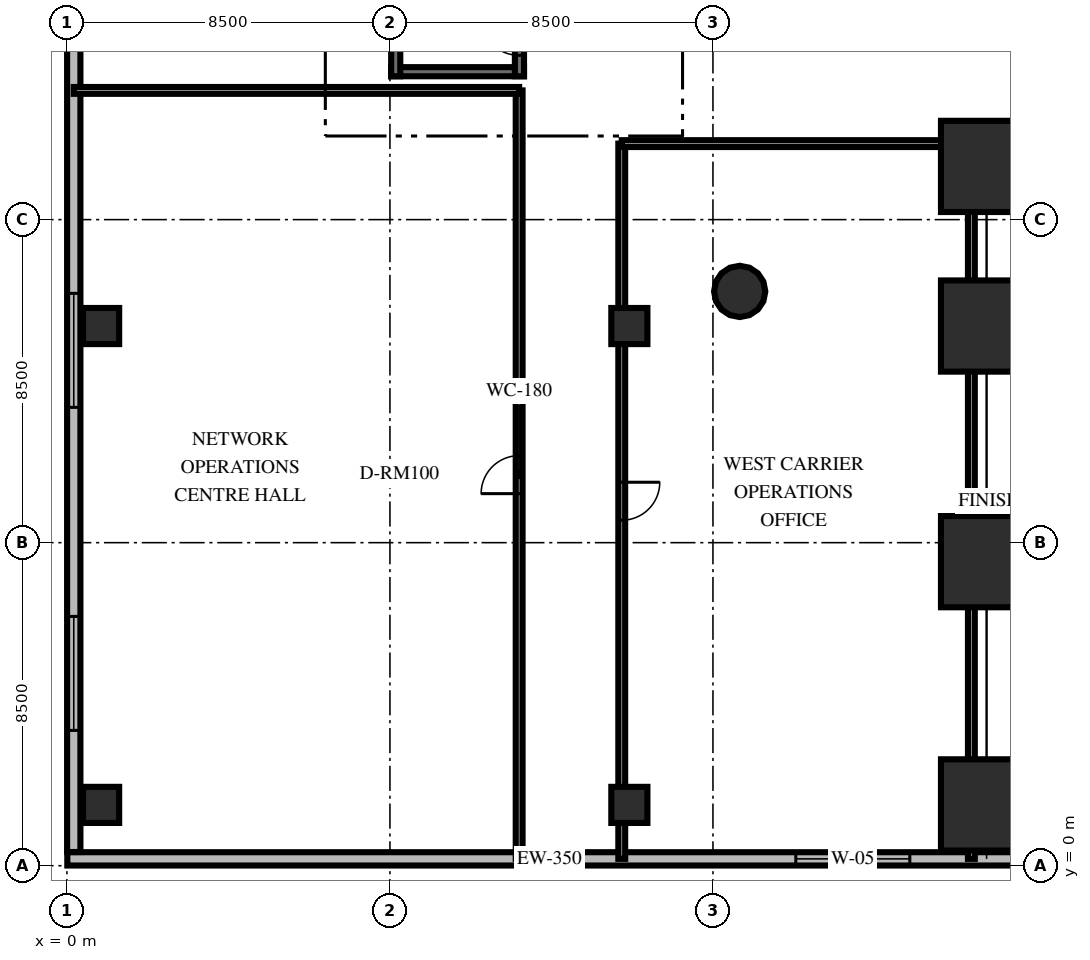
"""IFC4 building model, lengths in metres.
Left out: names, types, materials, properties, quantities, classifications, styles, units other than length and angle.
Written with IfcOpenShell. Run it as: python <this file> out.ifc"""

import sys

from ifc_helpers import new_model, si_unit, direction, frame, frame_2d, origin, origin_2d, place, context, subcontext, project, spatial, rectangle, circle, extrude, element, fill, save


model = new_model("IFC4")
c1 = context("Model", 3, precision=1e-05, world=origin(), true_north=direction((0.0, 1.0)))
c2 = subcontext(c1, "Body", "Model", "MODEL_VIEW")
j1 = project(units=[si_unit("LENGTHUNIT", "METRE"), si_unit("PLANEANGLEUNIT", "RADIAN")], contexts=[c1])
p1 = place(None, origin())
s1 = spatial("IfcSite", under=j1, at=p1, CompositionType="ELEMENT")
p2 = place(p1, origin())
s2 = spatial("IfcBuilding", under=s1, at=p2, CompositionType="ELEMENT")
p3 = place(p2, frame((0.0, 0.0, 10.2)))
s3 = spatial("IfcBuildingStorey", under=s2, at=p3, CompositionType="ELEMENT", Elevation=10.2)
p4 = place(p3, frame((8.532, 20.892, 0.0), z_axis=(0.0, 0.0, 1.0), x_axis=(1.0, 0.0, 0.0)))
e1 = element("IfcWall", 1, at=p4, inside=s3, PredefinedType="SHEAR", context=c2, shape_type="SweptSolid", body=[
    extrude(rectangle(XDim=3.496, YDim=0.24, at=frame_2d((1.748, 0.0))), origin(), (0.0, 0.0, 1.0), 5.4),
])
p5 = place(p3, frame((8.652, 20.772, 0.0), z_axis=(0.0, 0.0, 1.0), x_axis=(0.0, 1.0, 0.0)))
e2 = element("IfcWall", 2, at=p5, inside=s3, PredefinedType="SHEAR", context=c2, shape_type="SweptSolid", body=[
    extrude(rectangle(XDim=9.556, YDim=0.24, at=frame_2d((4.778, 0.0))), origin(), (0.0, 0.0, 1.0), 5.4),
])
p6 = place(p3, frame((11.908, 20.772, 0.0), z_axis=(0.0, 0.0, 1.0), x_axis=(0.0, 1.0, 0.0)))
e3 = element("IfcWall", 3, at=p6, inside=s3, PredefinedType="SHEAR", context=c2, shape_type="SweptSolid", body=[
    extrude(rectangle(XDim=9.556, YDim=0.24, at=frame_2d((4.778, 0.0))), origin(), (0.0, 0.0, 1.0), 5.4),
])
p7 = place(p6, frame((0.55, 0.0, 0.0)))
e4 = element("IfcOpeningElement", 4, at=p7, cuts=e3, PredefinedType="OPENING", context=c2, shape_type="SweptSolid", body=[
    extrude(rectangle(XDim=1.05, YDim=2.15, at=frame_2d((0.525, 1.075))), frame((0.0, 0.13, 0.0), z_axis=(0.0, -1.0, 0.0), x_axis=(1.0, 0.0, 0.0)), (0.0, 0.0, 1.0), 0.26),
])
for number, where, z_axis, x_axis in (
    (5, (24.2, 1.6, 0.0), (0.0, 0.0, 1.0), (1.0, 0.0, 0.0)),
    (6, (24.2, 8.0, 0.0), (0.0, 0.0, 1.0), (1.0, 0.0, 0.0)),
    (7, (24.2, 14.2, 0.0), (0.0, 0.0, 1.0), (1.0, 0.0, 0.0)),
    (8, (24.2, 18.4, 0.0), (0.0, 0.0, 1.0), (1.0, 0.0, 0.0)),
):
    element("IfcColumn", number, at=place(p3, frame(where, z_axis=z_axis, x_axis=x_axis)), inside=s3, PredefinedType="USERDEFINED", context=c2, shape_type="SweptSolid", body=[
        extrude(rectangle(XDim=2.4, YDim=2.4, at=origin_2d()), origin(), (0.0, 0.0, 1.0), 5.4),
    ])
for number, where, z_axis, x_axis in (
    (9, (0.9, 1.6, 0.0), (0.0, 0.0, 1.0), (1.0, 0.0, 0.0)),
    (10, (0.9, 14.2, 0.0), (0.0, 0.0, 1.0), (1.0, 0.0, 0.0)),
    (11, (14.8, 1.6, 0.0), (0.0, 0.0, 1.0), (1.0, 0.0, 0.0)),
    (12, (14.8, 14.2, 0.0), (0.0, 0.0, 1.0), (1.0, 0.0, 0.0)),
):
    element("IfcColumn", number, at=place(p3, frame(where, z_axis=z_axis, x_axis=x_axis)), inside=s3, PredefinedType="COLUMN", context=c2, shape_type="SweptSolid", body=[
        extrude(rectangle(XDim=0.95, YDim=0.95, at=origin_2d()), origin(), (0.0, 0.0, 1.0), 5.4),
    ])
p8 = place(p3, frame((17.703, 15.111, 0.0), z_axis=(0.0, 0.0, 1.0), x_axis=(1.0, 0.0, 0.0)))
e13 = element("IfcColumn", 13, at=p8, inside=s3, PredefinedType="COLUMN", context=c2, shape_type="SweptSolid", body=[
    extrude(circle(Radius=0.675, at=origin_2d()), origin(), (0.0, 0.0, 1.0), 5.4),
])
p9 = place(p3, frame((25.38, 0.18, 0.0), z_axis=(0.0, 0.0, 1.0), x_axis=(-1.0, 0.0, 0.0)))
e14 = element("IfcWall", 14, at=p9, inside=s3, PredefinedType="SOLIDWALL", context=c2, shape_type="SweptSolid", body=[
    extrude(rectangle(XDim=25.37, YDim=0.35, at=frame_2d((12.685, 0.0))), origin(), (0.0, 0.0, 1.0), 4.36),
])
p10 = place(p9, frame((3.2, 0.0, 0.85)))
e15 = element("IfcOpeningElement", 15, at=p10, cuts=e14, PredefinedType="OPENING", context=c2, shape_type="SweptSolid", body=[
    extrude(rectangle(XDim=3.0, YDim=2.4, at=frame_2d((1.5, 1.2))), frame((0.0, 0.185, 0.0), z_axis=(0.0, -1.0, 0.0), x_axis=(1.0, 0.0, 0.0)), (0.0, 0.0, 1.0), 0.37),
])
p11 = place(p3, frame((0.18, 0.36, 0.0), z_axis=(0.0, 0.0, 1.0), x_axis=(0.0, 1.0, 0.0)))
e16 = element("IfcWall", 16, at=p11, inside=s3, PredefinedType="SOLIDWALL", context=c2, shape_type="SweptSolid", body=[
    extrude(rectangle(XDim=51.28, YDim=0.35, at=frame_2d((25.64, 0.0))), origin(), (0.0, 0.0, 1.0), 4.36),
])
p12 = place(p11, frame((3.2, 0.0, 0.85)))
e17 = element("IfcOpeningElement", 17, at=p12, cuts=e16, PredefinedType="OPENING", context=c2, shape_type="SweptSolid", body=[
    extrude(rectangle(XDim=3.0, YDim=2.4, at=frame_2d((1.5, 1.2))), frame((0.0, 0.185, 0.0), z_axis=(0.0, -1.0, 0.0), x_axis=(1.0, 0.0, 0.0)), (0.0, 0.0, 1.0), 0.37),
])
p13 = place(p11, frame((11.7, 0.0, 0.85)))
e18 = element("IfcOpeningElement", 18, at=p13, cuts=e16, PredefinedType="OPENING", context=c2, shape_type="SweptSolid", body=[
    extrude(rectangle(XDim=3.0, YDim=2.4, at=frame_2d((1.5, 1.2))), frame((0.0, 0.185, 0.0), z_axis=(0.0, -1.0, 0.0), x_axis=(1.0, 0.0, 0.0)), (0.0, 0.0, 1.0), 0.37),
])
p14 = place(p11, frame((22.05, 0.0, 0.85)))
e19 = element("IfcOpeningElement", 19, at=p14, cuts=e16, PredefinedType="OPENING", context=c2, shape_type="SweptSolid", body=[
    extrude(rectangle(XDim=3.0, YDim=2.4, at=frame_2d((1.5, 1.2))), frame((0.0, 0.185, 0.0), z_axis=(0.0, -1.0, 0.0), x_axis=(1.0, 0.0, 0.0)), (0.0, 0.0, 1.0), 0.37),
])
p15 = place(p11, frame((37.2, 0.0, 0.85)))
e20 = element("IfcOpeningElement", 20, at=p15, cuts=e16, PredefinedType="OPENING", context=c2, shape_type="SweptSolid", body=[
    extrude(rectangle(XDim=3.0, YDim=2.4, at=frame_2d((1.5, 1.2))), frame((0.0, 0.185, 0.0), z_axis=(0.0, -1.0, 0.0), x_axis=(1.0, 0.0, 0.0)), (0.0, 0.0, 1.0), 0.37),
])
p16 = place(p3, frame((11.9, 0.18, 0.0), z_axis=(0.0, 0.0, 1.0), x_axis=(0.0, 1.0, 0.0)))
e21 = element("IfcWall", 21, at=p16, inside=s3, PredefinedType="PARTITIONING", context=c2, shape_type="SweptSolid", body=[
    extrude(rectangle(XDim=20.22, YDim=0.18, at=frame_2d((10.11, 0.0))), origin(), (0.0, 0.0, 1.0), 3.21),
])
p17 = place(p16, frame((9.61, 0.0, 0.0)))
e22 = element("IfcOpeningElement", 22, at=p17, cuts=e21, PredefinedType="OPENING", context=c2, shape_type="SweptSolid", body=[
    extrude(rectangle(XDim=1.0, YDim=2.15, at=frame_2d((0.5, 1.075))), frame((0.0, 0.1, 0.0), z_axis=(0.0, -1.0, 0.0), x_axis=(1.0, 0.0, 0.0)), (0.0, 0.0, 1.0), 0.2),
])
p18 = place(p3, frame((11.9, 20.4, 0.0), z_axis=(0.0, 0.0, 1.0), x_axis=(-1.0, 0.0, 0.0)))
e23 = element("IfcWall", 23, at=p18, inside=s3, PredefinedType="PARTITIONING", context=c2, shape_type="SweptSolid", body=[
    extrude(rectangle(XDim=11.72, YDim=0.18, at=frame_2d((5.86, 0.0))), origin(), (0.0, 0.0, 1.0), 3.21),
])
p19 = place(p3, frame((14.6, 19.0, 0.0), z_axis=(0.0, 0.0, 1.0), x_axis=(0.0, -1.0, 0.0)))
e24 = element("IfcWall", 24, at=p19, inside=s3, PredefinedType="PARTITIONING", context=c2, shape_type="SweptSolid", body=[
    extrude(rectangle(XDim=18.82, YDim=0.18, at=frame_2d((9.41, 0.0))), origin(), (0.0, 0.0, 1.0), 3.21),
])
p20 = place(p19, frame((8.91, 0.0, 0.0)))
e25 = element("IfcOpeningElement", 25, at=p20, cuts=e24, PredefinedType="OPENING", context=c2, shape_type="SweptSolid", body=[
    extrude(rectangle(XDim=1.0, YDim=2.15, at=frame_2d((0.5, 1.075))), frame((0.0, 0.1, 0.0), z_axis=(0.0, -1.0, 0.0), x_axis=(1.0, 0.0, 0.0)), (0.0, 0.0, 1.0), 0.2),
])
p21 = place(p3, frame((23.8, 0.18, 0.0), z_axis=(0.0, 0.0, 1.0), x_axis=(0.0, 1.0, 0.0)))
e26 = element("IfcWall", 26, at=p21, inside=s3, PredefinedType="PARTITIONING", context=c2, shape_type="SweptSolid", body=[
    extrude(rectangle(XDim=18.82, YDim=0.18, at=frame_2d((9.41, 0.0))), origin(), (0.0, 0.0, 1.0), 3.21),
])
p22 = place(p3, frame((23.8, 19.0, 0.0), z_axis=(0.0, 0.0, 1.0), x_axis=(-1.0, 0.0, 0.0)))
e27 = element("IfcWall", 27, at=p22, inside=s3, PredefinedType="PARTITIONING", context=c2, shape_type="SweptSolid", body=[
    extrude(rectangle(XDim=9.2, YDim=0.18, at=frame_2d((4.6, 0.0))), origin(), (0.0, 0.0, 1.0), 3.21),
])
p23 = place(p10, origin())
e28 = element("IfcWindow", 28, at=p23, inside=s3, PartitioningType="SINGLE_PANEL", PredefinedType="WINDOW", context=c2, shape_type="SweptSolid", body=[
    extrude(rectangle(XDim=3.0, YDim=2.4, at=frame_2d((1.5, 1.2))), frame((0.0, 0.03, 0.0), z_axis=(0.0, -1.0, 0.0), x_axis=(1.0, 0.0, 0.0)), (0.0, 0.0, 1.0), 0.06),
])
fill(e15, e28)
p24 = place(p12, origin())
e29 = element("IfcWindow", 29, at=p24, inside=s3, PartitioningType="SINGLE_PANEL", PredefinedType="WINDOW", context=c2, shape_type="SweptSolid", body=[
    extrude(rectangle(XDim=3.0, YDim=2.4, at=frame_2d((1.5, 1.2))), frame((0.0, 0.03, 0.0), z_axis=(0.0, -1.0, 0.0), x_axis=(1.0, 0.0, 0.0)), (0.0, 0.0, 1.0), 0.06),
])
fill(e17, e29)
p25 = place(p13, origin())
e30 = element("IfcWindow", 30, at=p25, inside=s3, PartitioningType="SINGLE_PANEL", PredefinedType="WINDOW", context=c2, shape_type="SweptSolid", body=[
    extrude(rectangle(XDim=3.0, YDim=2.4, at=frame_2d((1.5, 1.2))), frame((0.0, 0.03, 0.0), z_axis=(0.0, -1.0, 0.0), x_axis=(1.0, 0.0, 0.0)), (0.0, 0.0, 1.0), 0.06),
])
fill(e18, e30)
p26 = place(p7, origin())
e31 = element("IfcDoor", 31, at=p26, inside=s3, OperationType="SINGLE_SWING_RIGHT", PredefinedType="DOOR", context=c2, shape_type="SweptSolid", body=[
    extrude(rectangle(XDim=1.05, YDim=2.15, at=frame_2d((0.525, 1.075))), frame((0.0, 0.025, 0.0), z_axis=(0.0, -1.0, 0.0), x_axis=(1.0, 0.0, 0.0)), (0.0, 0.0, 1.0), 0.05),
])
fill(e4, e31)
p27 = place(p17, origin())
e32 = element("IfcDoor", 32, at=p27, inside=s3, OperationType="SINGLE_SWING_LEFT", PredefinedType="DOOR", context=c2, shape_type="SweptSolid", body=[
    extrude(rectangle(XDim=1.0, YDim=2.15, at=frame_2d((0.5, 1.075))), frame((0.0, 0.025, 0.0), z_axis=(0.0, -1.0, 0.0), x_axis=(1.0, 0.0, 0.0)), (0.0, 0.0, 1.0), 0.05),
])
fill(e22, e32)
p28 = place(p20, origin())
e33 = element("IfcDoor", 33, at=p28, inside=s3, OperationType="SINGLE_SWING_LEFT", PredefinedType="DOOR", context=c2, shape_type="SweptSolid", body=[
    extrude(rectangle(XDim=1.0, YDim=2.15, at=frame_2d((0.5, 1.075))), frame((0.0, 0.025, 0.0), z_axis=(0.0, -1.0, 0.0), x_axis=(1.0, 0.0, 0.0)), (0.0, 0.0, 1.0), 0.05),
])
fill(e25, e33)
save(model, sys.argv[1])
